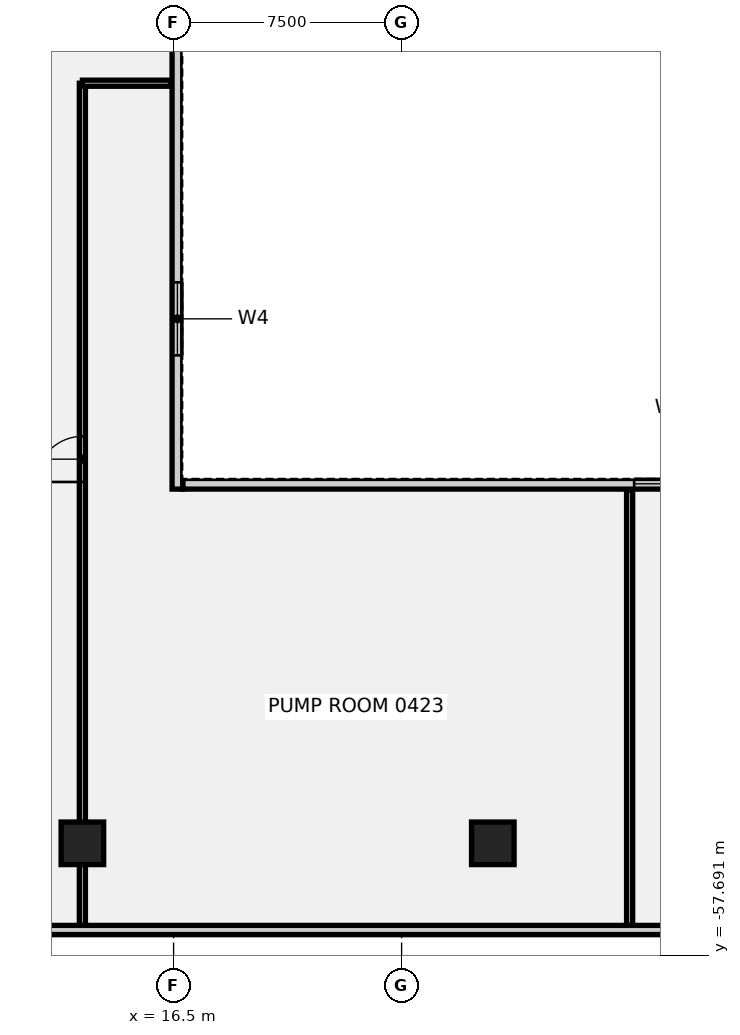
"""IFC4 building model, lengths in metres.
Left out: names, types, materials, properties, quantities, classifications, styles, units other than length and angle.
Written with IfcOpenShell. Run it as: python <this file> out.ifc"""

import sys

from ifc_helpers import new_model, si_unit, direction, frame, frame_2d, origin, origin_2d, place, context, subcontext, project, spatial, rectangle, extrude, element, fill, save


model = new_model("IFC4")
c1 = context("Model", 3, precision=1e-05, world=origin(), true_north=direction((0.0, 1.0)))
c2 = subcontext(c1, "Body", "Model", "MODEL_VIEW")
j1 = project(units=[si_unit("LENGTHUNIT", "METRE"), si_unit("PLANEANGLEUNIT", "RADIAN")], contexts=[c1])
p1 = place(None, origin())
s1 = spatial("IfcSite", under=j1, at=p1, CompositionType="ELEMENT")
p2 = place(p1, origin())
s2 = spatial("IfcBuilding", under=s1, at=p2, CompositionType="ELEMENT")
p3 = place(p2, frame((0.0, 0.0, 25.0)))
s3 = spatial("IfcBuildingStorey", under=s2, at=p3, CompositionType="ELEMENT", Elevation=25.0)
for number, where, z_axis, x_axis in (
    (1, (13.5, -54.0, -0.45), (0.0, 0.0, 1.0), (1.0, 0.0, 0.0)),
    (2, (27.0, -54.0, -0.45), (0.0, 0.0, 1.0), (1.0, 0.0, 0.0)),
):
    element("IfcColumn", number, at=place(p3, frame(where, z_axis=z_axis, x_axis=x_axis)), inside=s3, PredefinedType="COLUMN", context=c2, shape_type="SweptSolid", body=[
        extrude(rectangle(XDim=1.4, YDim=1.4, at=origin_2d()), origin(), (0.0, 0.0, 1.0), 4.35),
    ])
p4 = place(p3, frame((13.5, -56.699, 0.0), z_axis=(0.0, 0.0, 1.0), x_axis=(0.0, 1.0, 0.0)))
e3 = element("IfcWall", 3, at=p4, inside=s3, PredefinedType="PARTITIONING", context=c2, shape_type="SweptSolid", body=[
    extrude(rectangle(XDim=27.699, YDim=0.2, at=frame_2d((13.85, 0.0))), origin(), (0.0, 0.0, 1.0), 3.9),
])
p5 = place(p4, frame((14.584, 0.0, 0.0)))
e4 = element("IfcOpeningElement", 4, at=p5, cuts=e3, PredefinedType="OPENING", context=c2, shape_type="SweptSolid", body=[
    extrude(rectangle(XDim=1.5, YDim=2.1, at=frame_2d((0.75, 1.05))), frame((0.0, 0.11, 0.0), z_axis=(0.0, -1.0, 0.0), x_axis=(1.0, 0.0, 0.0)), (0.0, 0.0, 1.0), 0.22),
])
p6 = place(p3, frame((13.5, -29.0, 0.0), z_axis=(0.0, 0.0, 1.0), x_axis=(1.0, 0.0, 0.0)))
e5 = element("IfcWall", 5, at=p6, inside=s3, PredefinedType="PARTITIONING", context=c2, shape_type="SweptSolid", body=[
    extrude(rectangle(XDim=2.92, YDim=0.2, at=frame_2d((1.46, 0.0))), origin(), (0.0, 0.0, 1.0), 3.9),
])
p7 = place(p3, frame((31.5, -56.699, 0.0), z_axis=(0.0, 0.0, 1.0), x_axis=(0.0, 1.0, 0.0)))
e6 = element("IfcWall", 6, at=p7, inside=s3, PredefinedType="PARTITIONING", context=c2, shape_type="SweptSolid", body=[
    extrude(rectangle(XDim=14.319, YDim=0.2, at=frame_2d((7.16, 0.0))), origin(), (0.0, 0.0, 1.0), 3.9),
])
p8 = place(p3, frame((-55.988, -56.85, 0.0), z_axis=(0.0, 0.0, 1.0), x_axis=(1.0, 0.0, 0.0)))
e7 = element("IfcWall", 7, at=p8, inside=s3, PredefinedType="SOLIDWALL", context=c2, shape_type="SweptSolid", body=[
    extrude(rectangle(XDim=111.977, YDim=0.3, at=frame_2d((55.988, 0.0))), origin(), (0.0, 0.0, 1.0), 3.9),
])
p9 = place(p8, frame((12.488, 0.0, 1.4)))
e8 = element("IfcOpeningElement", 8, at=p9, cuts=e7, PredefinedType="OPENING", context=c2, shape_type="SweptSolid", body=[
    extrude(rectangle(XDim=6.0, YDim=2.2, at=frame_2d((3.0, 1.1))), frame((0.0, 0.16, 0.0), z_axis=(0.0, -1.0, 0.0), x_axis=(1.0, 0.0, 0.0)), (0.0, 0.0, 1.0), 0.32),
])
p10 = place(p3, frame((16.8, -42.175, 0.0), z_axis=(0.0, 0.0, 1.0), x_axis=(1.0, 0.0, 0.0)))
e9 = element("IfcWall", 9, at=p10, inside=s3, PredefinedType="SOLIDWALL", context=c2, shape_type="SweptSolid", body=[
    extrude(rectangle(XDim=26.7, YDim=0.35, at=frame_2d((13.35, 0.0))), origin(), (0.0, 0.0, 1.0), 3.9),
])
p11 = place(p10, frame((14.85, 0.0, 1.0)))
e10 = element("IfcOpeningElement", 10, at=p11, cuts=e9, PredefinedType="OPENING", context=c2, shape_type="SweptSolid", body=[
    extrude(rectangle(XDim=2.4, YDim=1.8, at=frame_2d((1.2, 0.9))), frame((0.0, 0.185, 0.0), z_axis=(0.0, -1.0, 0.0), x_axis=(1.0, 0.0, 0.0)), (0.0, 0.0, 1.0), 0.37),
])
p12 = place(p3, frame((16.625, -42.35, 0.0), z_axis=(0.0, 0.0, 1.0), x_axis=(0.0, 1.0, 0.0)))
e11 = element("IfcWall", 11, at=p12, inside=s3, PredefinedType="SOLIDWALL", context=c2, shape_type="SweptSolid", body=[
    extrude(rectangle(XDim=18.7, YDim=0.35, at=frame_2d((9.35, 0.0))), origin(), (0.0, 0.0, 1.0), 3.9),
])
p13 = place(p12, frame((4.4, 0.0, 1.0)))
e12 = element("IfcOpeningElement", 12, at=p13, cuts=e11, PredefinedType="OPENING", context=c2, shape_type="SweptSolid", body=[
    extrude(rectangle(XDim=2.4, YDim=1.8, at=frame_2d((1.2, 0.9))), frame((0.0, 0.185, 0.0), z_axis=(0.0, -1.0, 0.0), x_axis=(1.0, 0.0, 0.0)), (0.0, 0.0, 1.0), 0.37),
])
p14 = place(p5, origin())
e13 = element("IfcDoor", 13, at=p14, inside=s3, OperationType="SINGLE_SWING_LEFT", PredefinedType="DOOR", context=c2, shape_type="SweptSolid", body=[
    extrude(rectangle(XDim=1.5, YDim=2.1, at=frame_2d((0.75, 1.05))), frame((0.0, 0.025, 0.0), z_axis=(0.0, -1.0, 0.0), x_axis=(1.0, 0.0, 0.0)), (0.0, 0.0, 1.0), 0.05),
])
fill(e4, e13)
p15 = place(p11, origin())
e14 = element("IfcWindow", 14, at=p15, inside=s3, PartitioningType="SINGLE_PANEL", PredefinedType="WINDOW", context=c2, shape_type="SweptSolid", body=[
    extrude(rectangle(XDim=2.4, YDim=1.8, at=frame_2d((1.2, 0.9))), frame((0.0, 0.03, 0.0), z_axis=(0.0, -1.0, 0.0), x_axis=(1.0, 0.0, 0.0)), (0.0, 0.0, 1.0), 0.06),
])
fill(e10, e14)
p16 = place(p13, origin())
e15 = element("IfcWindow", 15, at=p16, inside=s3, PartitioningType="SINGLE_PANEL", PredefinedType="WINDOW", context=c2, shape_type="SweptSolid", body=[
    extrude(rectangle(XDim=2.4, YDim=1.8, at=frame_2d((1.2, 0.9))), frame((0.0, 0.03, 0.0), z_axis=(0.0, -1.0, 0.0), x_axis=(1.0, 0.0, 0.0)), (0.0, 0.0, 1.0), 0.06),
])
fill(e12, e15)
save(model, sys.argv[1])
